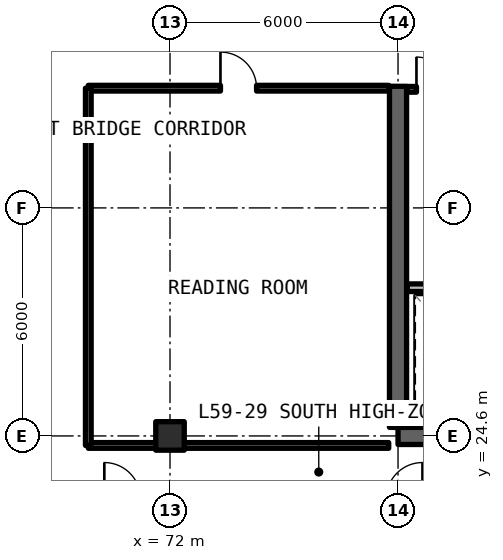
"""IFC4 building model, lengths in metres.
Left out: names, types, materials, properties, quantities, classifications, styles, units other than length and angle.
Written with IfcOpenShell. Run it as: python <this file> out.ifc"""

import sys

from ifc_helpers import new_model, si_unit, direction, frame, frame_2d, origin, origin_2d, place, context, subcontext, project, spatial, rectangle, extrude, element, fill, save


model = new_model("IFC4")
c1 = context("Model", 3, precision=1e-05, world=origin(), true_north=direction((0.0, 1.0)))
c2 = subcontext(c1, "Body", "Model", "MODEL_VIEW")
j1 = project(units=[si_unit("LENGTHUNIT", "METRE"), si_unit("PLANEANGLEUNIT", "RADIAN")], contexts=[c1])
p1 = place(None, origin())
s1 = spatial("IfcSite", under=j1, at=p1, CompositionType="ELEMENT")
p2 = place(p1, origin())
s2 = spatial("IfcBuilding", under=s1, at=p2, CompositionType="ELEMENT")
p3 = place(p2, frame((0.0, 0.0, 211.86)))
s3 = spatial("IfcBuildingStorey", under=s2, at=p3, CompositionType="ELEMENT", Elevation=211.86)
p4 = place(p3, frame((78.0, 24.6, 0.0), z_axis=(0.0, 0.0, 1.0), x_axis=(1.0, 0.0, 0.0)))
e1 = element("IfcWall", 1, at=p4, inside=s3, PredefinedType="SHEAR", context=c2, shape_type="SweptSolid", body=[
    extrude(rectangle(XDim=12.0, YDim=0.45, at=frame_2d((6.0, 0.0))), origin(), (0.0, 0.0, 1.0), 3.63),
])
p5 = place(p3, frame((78.0, 24.825, 0.0), z_axis=(0.0, 0.0, 1.0), x_axis=(0.0, 1.0, 0.0)))
e2 = element("IfcWall", 2, at=p5, inside=s3, PredefinedType="SHEAR", context=c2, shape_type="SweptSolid", body=[
    extrude(rectangle(XDim=8.975, YDim=0.45, at=frame_2d((4.488, 0.0))), origin(), (0.0, 0.0, 1.0), 3.63),
])
p6 = place(p3, frame((72.0, 24.6, 0.0), z_axis=(0.0, 0.0, 1.0), x_axis=(1.0, 0.0, 0.0)))
e3 = element("IfcColumn", 3, at=p6, inside=s3, PredefinedType="COLUMN", context=c2, shape_type="SweptSolid", body=[
    extrude(rectangle(XDim=0.75, YDim=0.75, at=origin_2d()), origin(), (0.0, 0.0, 1.0), 3.63),
])
p7 = place(p3, frame((78.245, 28.5, 0.0), z_axis=(0.0, 0.0, 1.0), x_axis=(1.0, 0.0, 0.0)))
e4 = element("IfcWall", 4, at=p7, inside=s3, PredefinedType="SOLIDWALL", context=c2, shape_type="SweptSolid", body=[
    extrude(rectangle(XDim=7.585, YDim=0.2, at=frame_2d((3.792, 0.0))), origin(), (0.0, 0.0, 1.0), 2.63),
])
p8 = place(p7, frame((3.555, 0.0, 0.0)))
e5 = element("IfcOpeningElement", 5, at=p8, cuts=e4, PredefinedType="OPENING", context=c2, shape_type="SweptSolid", body=[
    extrude(rectangle(XDim=1.0, YDim=2.15, at=frame_2d((0.5, 1.075))), frame((0.0, 0.11, 0.0), z_axis=(0.0, -1.0, 0.0), x_axis=(1.0, 0.0, 0.0)), (0.0, 0.0, 1.0), 0.22),
])
p9 = place(p3, frame((78.245, 33.72, 0.0), z_axis=(0.0, 0.0, 1.0), x_axis=(1.0, 0.0, 0.0)))
e6 = element("IfcWall", 6, at=p9, inside=s3, PredefinedType="SOLIDWALL", context=c2, shape_type="SweptSolid", body=[
    extrude(rectangle(XDim=1.395, YDim=0.15, at=frame_2d((0.697, 0.0))), origin(), (0.0, 0.0, 1.0), 2.63),
])
p10 = place(p9, frame((0.24, 0.0, 0.0)))
e7 = element("IfcOpeningElement", 7, at=p10, cuts=e6, PredefinedType="OPENING", context=c2, shape_type="SweptSolid", body=[
    extrude(rectangle(XDim=0.85, YDim=2.1, at=frame_2d((0.425, 1.05))), frame((0.0, 0.085, 0.0), z_axis=(0.0, -1.0, 0.0), x_axis=(1.0, 0.0, 0.0)), (0.0, 0.0, 1.0), 0.17),
])
p11 = place(p3, frame((69.85, 24.35, 0.0), z_axis=(0.0, 0.0, 1.0), x_axis=(1.0, 0.0, 0.0)))
e8 = element("IfcWall", 8, at=p11, inside=s3, PredefinedType="SOLIDWALL", context=c2, shape_type="SweptSolid", body=[
    extrude(rectangle(XDim=7.905, YDim=0.15, at=frame_2d((3.952, 0.0))), origin(), (0.0, 0.0, 1.0), 2.63),
])
p12 = place(p3, frame((69.85, 33.75, 0.0), z_axis=(0.0, 0.0, 1.0), x_axis=(1.0, 0.0, 0.0)))
e9 = element("IfcWall", 9, at=p12, inside=s3, PredefinedType="SOLIDWALL", context=c2, shape_type="SweptSolid", body=[
    extrude(rectangle(XDim=7.905, YDim=0.15, at=frame_2d((3.952, 0.0))), origin(), (0.0, 0.0, 1.0), 2.63),
])
p13 = place(p12, frame((3.478, 0.0, 0.0)))
e10 = element("IfcOpeningElement", 10, at=p13, cuts=e9, PredefinedType="OPENING", context=c2, shape_type="SweptSolid", body=[
    extrude(rectangle(XDim=0.95, YDim=2.15, at=frame_2d((0.475, 1.075))), frame((0.0, 0.085, 0.0), z_axis=(0.0, -1.0, 0.0), x_axis=(1.0, 0.0, 0.0)), (0.0, 0.0, 1.0), 0.17),
])
p14 = place(p3, frame((69.85, 24.35, 0.0), z_axis=(0.0, 0.0, 1.0), x_axis=(0.0, 1.0, 0.0)))
e11 = element("IfcWall", 11, at=p14, inside=s3, PredefinedType="SOLIDWALL", context=c2, shape_type="SweptSolid", body=[
    extrude(rectangle(XDim=9.4, YDim=0.15, at=frame_2d((4.7, 0.0))), origin(), (0.0, 0.0, 1.0), 2.63),
])
p15 = place(p10, origin())
e12 = element("IfcDoor", 12, at=p15, inside=s3, OperationType="SINGLE_SWING_LEFT", PredefinedType="DOOR", context=c2, shape_type="SweptSolid", body=[
    extrude(rectangle(XDim=0.85, YDim=2.1, at=frame_2d((0.425, 1.05))), frame((0.0, 0.025, 0.0), z_axis=(0.0, -1.0, 0.0), x_axis=(1.0, 0.0, 0.0)), (0.0, 0.0, 1.0), 0.05),
])
fill(e7, e12)
p16 = place(p13, origin())
e13 = element("IfcDoor", 13, at=p16, inside=s3, OperationType="SINGLE_SWING_LEFT", PredefinedType="DOOR", context=c2, shape_type="SweptSolid", body=[
    extrude(rectangle(XDim=0.95, YDim=2.15, at=frame_2d((0.475, 1.075))), frame((0.0, 0.025, 0.0), z_axis=(0.0, -1.0, 0.0), x_axis=(1.0, 0.0, 0.0)), (0.0, 0.0, 1.0), 0.05),
])
fill(e10, e13)
save(model, sys.argv[1])
